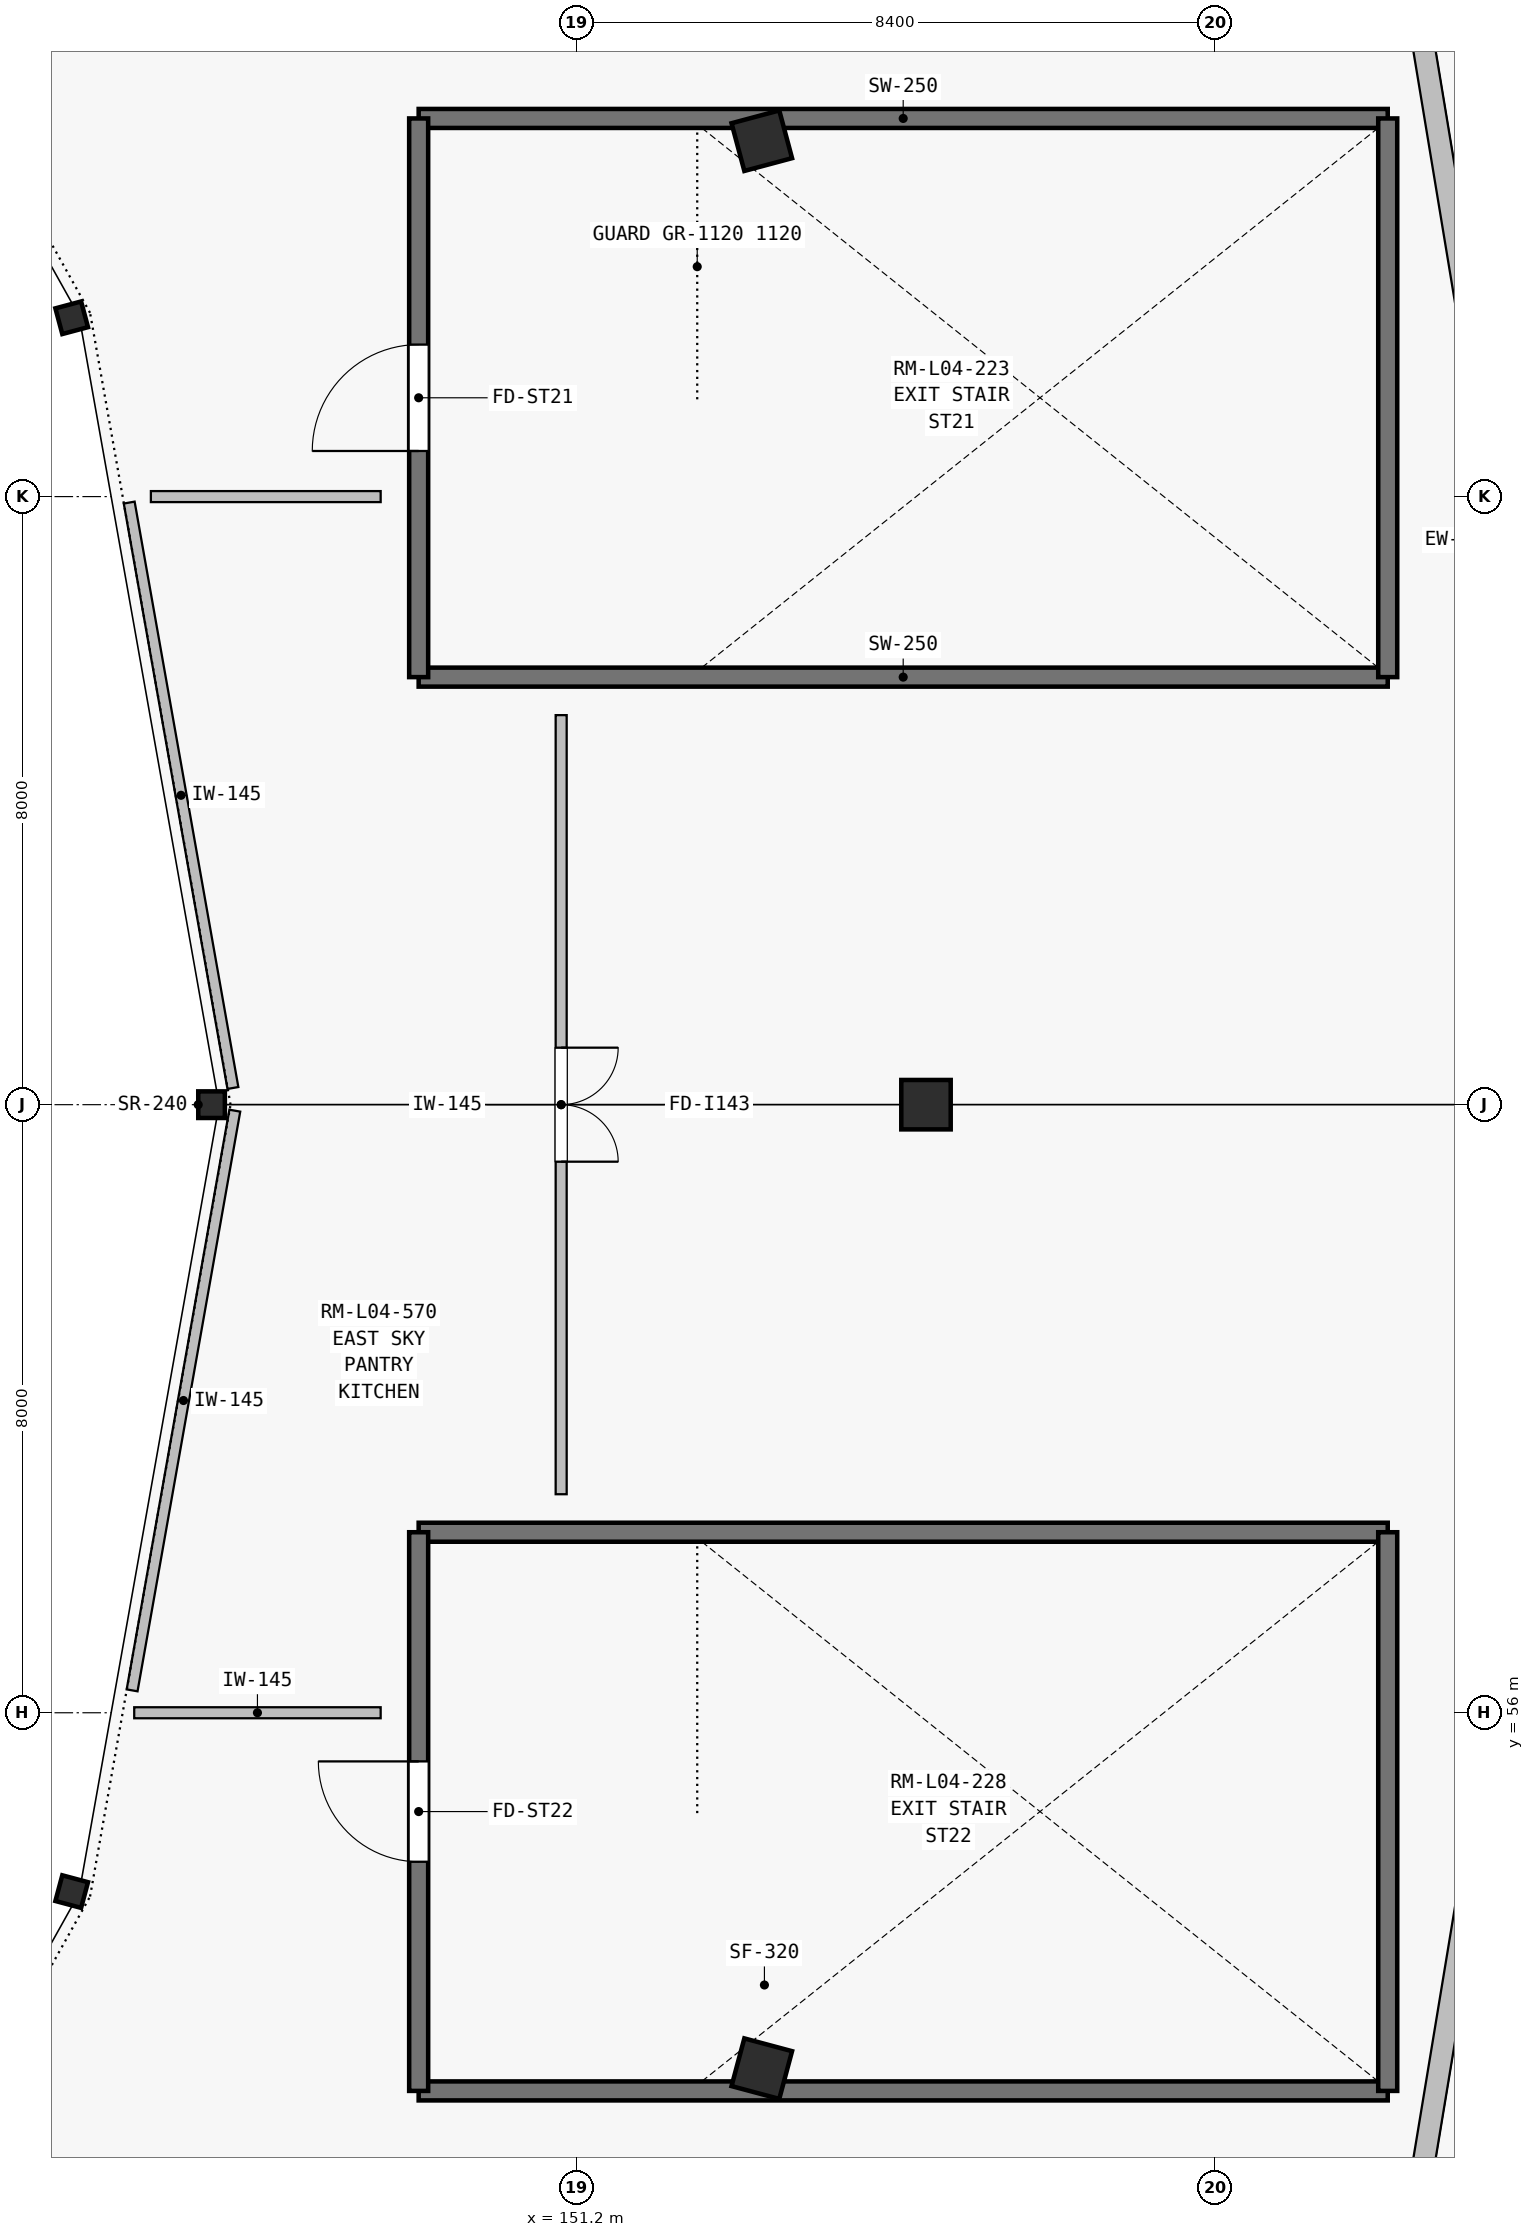
"""IFC4 building model, lengths in metres.
Left out: names, types, materials, properties, quantities, classifications, styles, units other than length and angle.
Written with IfcOpenShell. Run it as: python <this file> out.ifc"""

import sys

from ifc_helpers import new_model, si_unit, direction, frame, frame_2d, origin, origin_2d, place, context, subcontext, project, spatial, rectangle, i_section, extrude, element, fill, save


model = new_model("IFC4")
c1 = context("Model", 3, precision=1e-05, world=origin(), true_north=direction((0.0, 1.0)))
c2 = subcontext(c1, "Body", "Model", "MODEL_VIEW")
j1 = project(units=[si_unit("LENGTHUNIT", "METRE"), si_unit("PLANEANGLEUNIT", "RADIAN")], contexts=[c1])
p1 = place(None, origin())
s1 = spatial("IfcSite", under=j1, at=p1, CompositionType="ELEMENT")
p2 = place(p1, origin())
s2 = spatial("IfcBuilding", under=s1, at=p2, CompositionType="ELEMENT")
p3 = place(p2, frame((0.0, 0.0, 18.9)))
s3 = spatial("IfcBuildingStorey", under=s2, at=p3, CompositionType="ELEMENT", Elevation=18.9)
for number, where, z_axis, x_axis in (
    (1, (146.4, 64.0, 0.0), (0.0, 0.0, 1.0), (1.0, 0.0, 0.0)),
    (2, (144.56, 74.353, 0.0), (0.0, 0.0, 1.0), (0.966, 0.259, 0.0)),
    (3, (144.56, 53.647, 0.0), (0.0, 0.0, 1.0), (0.966, -0.259, 0.0)),
):
    element("IfcColumn", number, at=place(p3, frame(where, z_axis=z_axis, x_axis=x_axis)), inside=s3, PredefinedType="COLUMN", context=c2, shape_type="SweptSolid", body=[
        extrude(i_section(OverallWidth=0.35, OverallDepth=0.35, WebThickness=0.014, FlangeThickness=0.024, at=origin_2d()), origin(), (0.0, 0.0, 1.0), 4.5),
    ])
for number, where, z_axis, x_axis in (
    (4, (155.8, 64.0, 0.0), (0.0, 0.0, 1.0), (1.0, 0.0, 0.0)),
    (5, (153.64, 76.682, 0.0), (0.0, 0.0, 1.0), (0.966, 0.259, 0.0)),
    (6, (153.64, 51.318, 0.0), (0.0, 0.0, 1.0), (0.966, -0.259, 0.0)),
):
    element("IfcColumn", number, at=place(p3, frame(where, z_axis=z_axis, x_axis=x_axis)), inside=s3, PredefinedType="COLUMN", context=c2, shape_type="SweptSolid", body=[
        extrude(rectangle(XDim=0.65, YDim=0.65, at=origin_2d()), origin(), (0.0, 0.0, 1.0), 4.5),
    ])
p4 = place(p3, frame((162.163, 79.05, 0.0), z_axis=(0.0, 0.0, 1.0), x_axis=(0.163248112774, -0.986585046347, 0.0)))
e7 = element("IfcWall", 7, at=p4, inside=s3, PredefinedType="SOLIDWALL", context=c2, shape_type="SweptSolid", body=[
    extrude(rectangle(XDim=15.447, YDim=0.29, at=frame_2d((7.724, 0.0))), origin(), (0.0, 0.0, 1.0), 4.21),
])
p5 = place(p4, frame((7.125, 0.0, 0.9)))
e8 = element("IfcOpeningElement", 8, at=p5, cuts=e7, PredefinedType="OPENING", context=c2, shape_type="SweptSolid", body=[
    extrude(rectangle(XDim=1.45, YDim=1.4, at=frame_2d((0.725, 0.7))), frame((0.0, 0.155, 0.0), z_axis=(0.0, -1.0, 0.0), x_axis=(1.0, 0.0, 0.0)), (0.0, 0.0, 1.0), 0.31),
])
p6 = place(p4, frame((11.625, 0.0, 0.75)))
e9 = element("IfcOpeningElement", 9, at=p6, cuts=e7, PredefinedType="OPENING", context=c2, shape_type="SweptSolid", body=[
    extrude(rectangle(XDim=1.65, YDim=2.4, at=frame_2d((0.825, 1.2))), frame((0.0, 0.155, 0.0), z_axis=(0.0, -1.0, 0.0), x_axis=(1.0, 0.0, 0.0)), (0.0, 0.0, 1.0), 0.31),
])
p7 = place(p3, frame((164.684, 64.19, 0.0), z_axis=(0.0, 0.0, 1.0), x_axis=(-0.163248112774, -0.986585046347, 0.0)))
e10 = element("IfcWall", 10, at=p7, inside=s3, PredefinedType="SOLIDWALL", context=c2, shape_type="SweptSolid", body=[
    extrude(rectangle(XDim=15.447, YDim=0.29, at=frame_2d((7.724, 0.0))), origin(), (0.0, 0.0, 1.0), 4.23),
])
p8 = place(p7, frame((2.35, 0.0, 0.75)))
e11 = element("IfcOpeningElement", 11, at=p8, cuts=e10, PredefinedType="OPENING", context=c2, shape_type="SweptSolid", body=[
    extrude(rectangle(XDim=1.8, YDim=2.4, at=frame_2d((0.9, 1.2))), frame((0.0, 0.155, 0.0), z_axis=(0.0, -1.0, 0.0), x_axis=(1.0, 0.0, 0.0)), (0.0, 0.0, 1.0), 0.31),
])
for number, where, z_axis, x_axis in (
    (12, (149.125, 69.625, 0.0), (0.0, 0.0, 1.0), (1.0, 0.0, 0.0)),
    (13, (149.125, 76.975, 0.0), (0.0, 0.0, 1.0), (1.0, 0.0, 0.0)),
):
    element("IfcWall", number, at=place(p3, frame(where, z_axis=z_axis, x_axis=x_axis)), inside=s3, PredefinedType="SHEAR", context=c2, shape_type="SweptSolid", body=[
        extrude(rectangle(XDim=12.75, YDim=0.25, at=frame_2d((6.375, 0.0))), origin(), (0.0, 0.0, 1.0), 4.5),
    ])
p9 = place(p3, frame((149.125, 69.625, 0.0), z_axis=(0.0, 0.0, 1.0), x_axis=(0.0, 1.0, 0.0)))
e14 = element("IfcWall", 14, at=p9, inside=s3, PredefinedType="SHEAR", context=c2, shape_type="SweptSolid", body=[
    extrude(rectangle(XDim=7.35, YDim=0.25, at=frame_2d((3.675, 0.0))), origin(), (0.0, 0.0, 1.0), 4.5),
])
p10 = place(p9, frame((2.975, 0.0, 0.0)))
e15 = element("IfcOpeningElement", 15, at=p10, cuts=e14, PredefinedType="OPENING", context=c2, shape_type="SweptSolid", body=[
    extrude(rectangle(XDim=1.4, YDim=2.2, at=frame_2d((0.7, 1.1))), frame((0.0, 0.135, 0.0), z_axis=(0.0, -1.0, 0.0), x_axis=(1.0, 0.0, 0.0)), (0.0, 0.0, 1.0), 0.27),
])
p11 = place(p3, frame((161.875, 69.625, 0.0), z_axis=(0.0, 0.0, 1.0), x_axis=(0.0, 1.0, 0.0)))
e16 = element("IfcWall", 16, at=p11, inside=s3, PredefinedType="SHEAR", context=c2, shape_type="SweptSolid", body=[
    extrude(rectangle(XDim=7.35, YDim=0.25, at=frame_2d((3.675, 0.0))), origin(), (0.0, 0.0, 1.0), 4.5),
])
for number, where, z_axis, x_axis in (
    (17, (149.125, 51.025, 0.0), (0.0, 0.0, 1.0), (1.0, 0.0, 0.0)),
    (18, (149.125, 58.375, 0.0), (0.0, 0.0, 1.0), (1.0, 0.0, 0.0)),
):
    element("IfcWall", number, at=place(p3, frame(where, z_axis=z_axis, x_axis=x_axis)), inside=s3, PredefinedType="SHEAR", context=c2, shape_type="SweptSolid", body=[
        extrude(rectangle(XDim=12.75, YDim=0.25, at=frame_2d((6.375, 0.0))), origin(), (0.0, 0.0, 1.0), 4.5),
    ])
p12 = place(p3, frame((149.125, 51.025, 0.0), z_axis=(0.0, 0.0, 1.0), x_axis=(0.0, 1.0, 0.0)))
e19 = element("IfcWall", 19, at=p12, inside=s3, PredefinedType="SHEAR", context=c2, shape_type="SweptSolid", body=[
    extrude(rectangle(XDim=7.35, YDim=0.25, at=frame_2d((3.675, 0.0))), origin(), (0.0, 0.0, 1.0), 4.5),
])
p13 = place(p12, frame((3.015, 0.0, 0.0)))
e20 = element("IfcOpeningElement", 20, at=p13, cuts=e19, PredefinedType="OPENING", context=c2, shape_type="SweptSolid", body=[
    extrude(rectangle(XDim=1.32, YDim=2.2, at=frame_2d((0.66, 1.1))), frame((0.0, 0.135, 0.0), z_axis=(0.0, -1.0, 0.0), x_axis=(1.0, 0.0, 0.0)), (0.0, 0.0, 1.0), 0.27),
])
p14 = place(p3, frame((161.875, 51.025, 0.0), z_axis=(0.0, 0.0, 1.0), x_axis=(0.0, 1.0, 0.0)))
e21 = element("IfcWall", 21, at=p14, inside=s3, PredefinedType="SHEAR", context=c2, shape_type="SweptSolid", body=[
    extrude(rectangle(XDim=7.35, YDim=0.25, at=frame_2d((3.675, 0.0))), origin(), (0.0, 0.0, 1.0), 4.5),
])
p15 = place(p3, frame((148.625, 56.0, 0.0), z_axis=(0.0, 0.0, 1.0), x_axis=(-1.0, 0.0, 0.0)))
e22 = element("IfcWall", 22, at=p15, inside=s3, PredefinedType="PARTITIONING", context=c2, shape_type="SweptSolid", body=[
    extrude(rectangle(XDim=3.242, YDim=0.145, at=frame_2d((1.621, 0.0))), origin(), (0.0, 0.0, 1.0), 4.23),
])
p16 = place(p3, frame((145.355, 56.295, 0.0), z_axis=(0.0, 0.0, 1.0), x_axis=(0.17447040417, 0.984662418329, 0.0)))
e23 = element("IfcWall", 23, at=p16, inside=s3, PredefinedType="PARTITIONING", context=c2, shape_type="SweptSolid", body=[
    extrude(rectangle(XDim=7.745, YDim=0.145, at=frame_2d((3.873, 0.0))), origin(), (0.0, 0.0, 1.0), 3.779),
])
p17 = place(p3, frame((146.681, 64.219, 0.0), z_axis=(0.0, 0.0, 1.0), x_axis=(-0.174483298866, 0.984660133456, 0.0)))
e24 = element("IfcWall", 24, at=p17, inside=s3, PredefinedType="PARTITIONING", context=c2, shape_type="SweptSolid", body=[
    extrude(rectangle(XDim=7.822, YDim=0.145, at=frame_2d((3.911, 0.0))), origin(), (0.0, 0.0, 1.0), 3.779),
])
p18 = place(p3, frame((145.602, 72.0, 0.0), z_axis=(0.0, 0.0, 1.0), x_axis=(1.0, 0.0, 0.0)))
e25 = element("IfcWall", 25, at=p18, inside=s3, PredefinedType="PARTITIONING", context=c2, shape_type="SweptSolid", body=[
    extrude(rectangle(XDim=3.023, YDim=0.145, at=frame_2d((1.512, 0.0))), origin(), (0.0, 0.0, 1.0), 4.21),
])
p19 = place(p3, frame((151.0, 69.125, 0.0), z_axis=(0.0, 0.0, 1.0), x_axis=(0.0, -1.0, 0.0)))
e26 = element("IfcWall", 26, at=p19, inside=s3, PredefinedType="PARTITIONING", context=c2, shape_type="SweptSolid", body=[
    extrude(rectangle(XDim=10.25, YDim=0.145, at=frame_2d((5.125, 0.0))), origin(), (0.0, 0.0, 1.0), 3.779),
])
p20 = place(p19, frame((4.375, 0.0, 0.0)))
e27 = element("IfcOpeningElement", 27, at=p20, cuts=e26, PredefinedType="OPENING", context=c2, shape_type="SweptSolid", body=[
    extrude(rectangle(XDim=1.5, YDim=2.2, at=frame_2d((0.75, 1.1))), frame((0.0, 0.083, 0.0), z_axis=(0.0, -1.0, 0.0), x_axis=(1.0, 0.0, 0.0)), (0.0, 0.0, 1.0), 0.165),
])
p21 = place(p10, origin())
e28 = element("IfcDoor", 28, at=p21, inside=s3, OperationType="SINGLE_SWING_LEFT", PredefinedType="DOOR", context=c2, shape_type="SweptSolid", body=[
    extrude(rectangle(XDim=1.4, YDim=2.2, at=frame_2d((0.7, 1.1))), frame((0.0, 0.025, 0.0), z_axis=(0.0, -1.0, 0.0), x_axis=(1.0, 0.0, 0.0)), (0.0, 0.0, 1.0), 0.05),
])
fill(e15, e28)
p22 = place(p13, origin())
e29 = element("IfcDoor", 29, at=p22, inside=s3, OperationType="SINGLE_SWING_RIGHT", PredefinedType="DOOR", context=c2, shape_type="SweptSolid", body=[
    extrude(rectangle(XDim=1.32, YDim=2.2, at=frame_2d((0.66, 1.1))), frame((0.0, 0.025, 0.0), z_axis=(0.0, -1.0, 0.0), x_axis=(1.0, 0.0, 0.0)), (0.0, 0.0, 1.0), 0.05),
])
fill(e20, e29)
p23 = place(p20, origin())
e30 = element("IfcDoor", 30, at=p23, inside=s3, OperationType="DOUBLE_DOOR_SINGLE_SWING", PredefinedType="DOOR", context=c2, shape_type="SweptSolid", body=[
    extrude(rectangle(XDim=1.5, YDim=2.2, at=frame_2d((0.75, 1.1))), frame((0.0, 0.025, 0.0), z_axis=(0.0, -1.0, 0.0), x_axis=(1.0, 0.0, 0.0)), (0.0, 0.0, 1.0), 0.05),
])
fill(e27, e30)
save(model, sys.argv[1])
